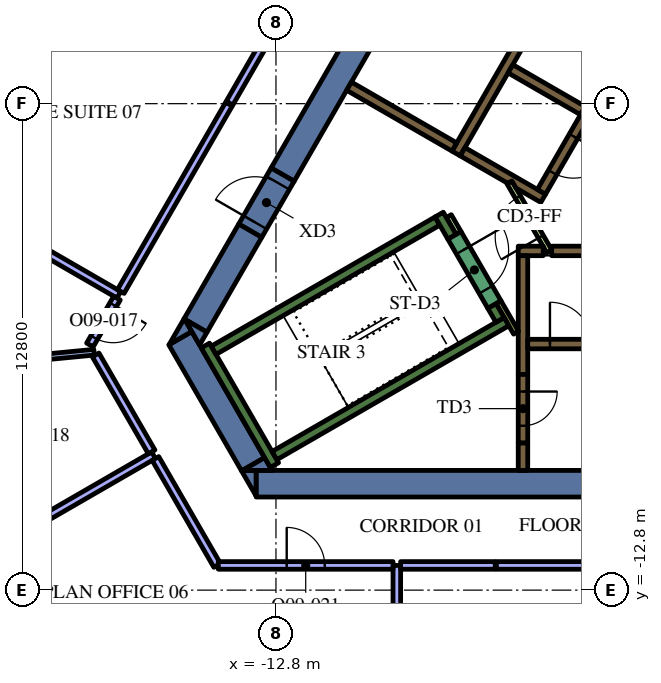
"""IFC4 building model, lengths in metres.
Left out: names, types, materials, properties, quantities, classifications, styles, units other than length and angle.
Written with IfcOpenShell. Run it as: python <this file> out.ifc"""

import sys

from ifc_helpers import new_model, si_unit, direction, frame, frame_2d, origin, place, context, subcontext, project, spatial, polyline, rectangle, outline, extrude, element, fill, save


model = new_model("IFC4")
c1 = context("Model", 3, precision=1e-05, world=origin(), true_north=direction((0.0, 1.0)))
c2 = subcontext(c1, "Body", "Model", "MODEL_VIEW")
j1 = project(units=[si_unit("LENGTHUNIT", "METRE"), si_unit("PLANEANGLEUNIT", "RADIAN")], contexts=[c1])
p1 = place(None, origin())
s1 = spatial("IfcSite", under=j1, at=p1, CompositionType="ELEMENT")
p2 = place(p1, origin())
s2 = spatial("IfcBuilding", under=s1, at=p2, CompositionType="ELEMENT")
p3 = place(p2, frame((0.0, 0.0, 243.6)))
s3 = spatial("IfcBuildingStorey", under=s2, at=p3, CompositionType="ELEMENT", Elevation=243.6)
p4 = place(p3, frame((8.904, -10.0, 0.0), z_axis=(0.0, 0.0, 1.0), x_axis=(-1.0, 0.0, 0.0)))
e1 = element("IfcWall", 1, at=p4, inside=s3, PredefinedType="SOLIDWALL", context=c2, shape_type="SweptSolid", body=[
    extrude(rectangle(XDim=22.226, YDim=0.7, at=frame_2d((11.113, 0.0))), origin(), (0.0, 0.0, 1.0), 4.2),
])
p5 = place(p3, origin())
e2 = element("IfcWall", 2, at=p5, inside=s3, PredefinedType="SOLIDWALL", context=c2, shape_type="SweptSolid", body=[
    extrude(outline(polyline([(-13.712, -9.65), (-13.324, -9.65), (-13.324, -10.322), (-13.712, -9.65)])), origin(), (0.0, 0.0, 1.0), 4.2),
])
p6 = place(p3, frame((-13.402, -9.487, 0.0), z_axis=(0.0, 0.0, 1.0), x_axis=(-0.500020498207, 0.866013568815, 0.0)))
e3 = element("IfcWall", 3, at=p6, inside=s3, PredefinedType="SOLIDWALL", context=c2, shape_type="SweptSolid", body=[
    extrude(rectangle(XDim=3.829, YDim=0.7, at=frame_2d((1.915, 0.0))), origin(), (0.0, 0.0, 1.0), 4.2),
])
e4 = element("IfcWall", 4, at=p5, inside=s3, PredefinedType="SOLIDWALL", context=c2, shape_type="SweptSolid", body=[
    extrude(outline(polyline([(-15.014, -5.995), (-15.611, -6.339), (-15.213, -5.65), (-15.014, -5.995)])), origin(), (0.0, 0.0, 1.0), 4.2),
])
e5 = element("IfcWall", 5, at=p5, inside=s3, PredefinedType="SOLIDWALL", context=c2, shape_type="SweptSolid", body=[
    extrude(outline(polyline([(-12.904, -9.65), (-13.68, -9.65), (-13.098, -9.314), (-12.904, -9.65)])), origin(), (0.0, 0.0, 1.0), 4.2),
])
p7 = place(p3, frame((-13.475, -3.339, 0.0), z_axis=(0.0, 0.0, 1.0), x_axis=(-0.500008214683, -0.866020660983, 0.0)))
e6 = element("IfcWall", 6, at=p7, inside=s3, PredefinedType="SOLIDWALL", context=c2, shape_type="SweptSolid", body=[
    extrude(rectangle(XDim=2.884, YDim=0.7, at=frame_2d((1.442, 0.0))), origin(), (0.0, 0.0, 1.0), 4.2),
])
e7 = element("IfcWall", 7, at=p5, inside=s3, PredefinedType="SOLIDWALL", context=c2, shape_type="SweptSolid", body=[
    extrude(outline(polyline([(-14.809, -6.35), (-15.197, -5.678), (-14.615, -6.014), (-14.809, -6.35)])), origin(), (0.0, 0.0, 1.0), 4.2),
])
p8 = place(p3, frame((-12.625, -1.867, 0.0), z_axis=(0.0, 0.0, 1.0), x_axis=(0.499996974394, 0.866027150612, 0.0)))
e8 = element("IfcWall", 8, at=p8, inside=s3, PredefinedType="SOLIDWALL", context=c2, shape_type="SweptSolid", body=[
    extrude(rectangle(XDim=15.858, YDim=0.7, at=frame_2d((7.929, 0.0))), origin(), (0.0, 0.0, 1.0), 4.2),
])
p9 = place(p3, frame((-12.84, -9.511, 0.0), z_axis=(0.0, 0.0, 1.0), x_axis=(-0.499997733992, 0.866026712061, 0.0)))
e9 = element("IfcWall", 9, at=p9, inside=s3, PredefinedType="SOLIDWALL", context=c2, shape_type="SweptSolid", body=[
    extrude(rectangle(XDim=3.634, YDim=0.25, at=frame_2d((1.817, 0.0))), origin(), (0.0, 0.0, 1.0), 4.2),
])
p10 = place(p3, frame((-14.44, -6.49, 0.0), z_axis=(0.0, 0.0, 1.0), x_axis=(0.866022966069, 0.500004222222, 0.0)))
e10 = element("IfcWall", 10, at=p10, inside=s3, PredefinedType="SOLIDWALL", context=c2, shape_type="SweptSolid", body=[
    extrude(rectangle(XDim=6.8, YDim=0.25, at=frame_2d((3.4, 0.0))), origin(), (0.0, 0.0, 1.0), 4.2),
])
p11 = place(p3, frame((-8.168, -3.503, 0.0), z_axis=(0.0, 0.0, 1.0), x_axis=(-0.499952099219, 0.866053057547, 0.0)))
e11 = element("IfcWall", 11, at=p11, inside=s3, PredefinedType="SOLIDWALL", context=c2, shape_type="SweptSolid", body=[
    extrude(rectangle(XDim=0.675, YDim=0.25, at=frame_2d((0.337, 0.0))), origin(), (0.0, 0.0, 1.0), 4.2),
])
p12 = place(p3, frame((-12.84, -9.261, 0.0), z_axis=(0.0, 0.0, 1.0), x_axis=(0.866016039709, 0.500016218704, 0.0)))
e12 = element("IfcWall", 12, at=p12, inside=s3, PredefinedType="SOLIDWALL", context=c2, shape_type="SweptSolid", body=[
    extrude(rectangle(XDim=7.05, YDim=0.25, at=frame_2d((3.525, 0.0))), origin(), (0.0, 0.0, 1.0), 4.2),
])
p13 = place(p3, frame((-6.905, -5.69, 0.0), z_axis=(0.0, 0.0, 1.0), x_axis=(-0.500402024738, 0.865793170242, 0.0)))
e13 = element("IfcWall", 13, at=p13, inside=s3, PredefinedType="SOLIDWALL", context=c2, shape_type="SweptSolid", body=[
    extrude(rectangle(XDim=0.425, YDim=0.25, at=frame_2d((0.212, 0.0))), origin(), (0.0, 0.0, 1.0), 4.2),
])
p14 = place(p3, frame((-6.3, -8.925, 0.0), z_axis=(0.0, 0.0, 1.0), x_axis=(0.0, -1.0, 0.0)))
e14 = element("IfcWall", 14, at=p14, inside=s3, PredefinedType="SOLIDWALL", context=c2, shape_type="SweptSolid", body=[
    extrude(rectangle(XDim=0.725, YDim=0.25, at=frame_2d((0.363, 0.0))), origin(), (0.0, 0.0, 1.0), 4.2),
])
p15 = place(p3, frame((-5.545, -3.875, 0.0), z_axis=(0.0, 0.0, 1.0), x_axis=(1.0, 0.0, 0.0)))
e15 = element("IfcWall", 15, at=p15, inside=s3, PredefinedType="SOLIDWALL", context=c2, shape_type="SweptSolid", body=[
    extrude(rectangle(XDim=11.97, YDim=0.25, at=frame_2d((5.985, 0.0))), origin(), (0.0, 0.0, 1.0), 4.2),
])
p16 = place(p3, frame((-6.425, -3.875, 0.0), z_axis=(0.0, 0.0, 1.0), x_axis=(1.0, 0.0, 0.0)))
e16 = element("IfcWall", 16, at=p16, inside=s3, PredefinedType="SOLIDWALL", context=c2, shape_type="SweptSolid", body=[
    extrude(rectangle(XDim=0.658, YDim=0.25, at=frame_2d((0.329, 0.0))), origin(), (0.0, 0.0, 1.0), 4.2),
])
p17 = place(p3, frame((-6.3, -7.125, 0.0), z_axis=(0.0, 0.0, 1.0), x_axis=(0.0, 1.0, 0.0)))
e17 = element("IfcWall", 17, at=p17, inside=s3, PredefinedType="SOLIDWALL", context=c2, shape_type="SweptSolid", body=[
    extrude(rectangle(XDim=3.125, YDim=0.25, at=frame_2d((1.562, 0.0))), origin(), (0.0, 0.0, 1.0), 4.2),
])
p18 = place(p3, frame((-8.06, -1.311, 0.0), z_axis=(0.0, 0.0, 1.0), x_axis=(0.50000273126, 0.866023826885, 0.0)))
e18 = element("IfcWall", 18, at=p18, inside=s3, PredefinedType="SOLIDWALL", context=c2, shape_type="SweptSolid", body=[
    extrude(rectangle(XDim=10.33, YDim=0.25, at=frame_2d((5.165, 0.0))), origin(), (0.0, 0.0, 1.0), 4.2),
])
p19 = place(p3, frame((-4.724, -0.182, 0.0), z_axis=(0.0, 0.0, 1.0), x_axis=(-0.866008176907, 0.50002983664, 0.0)))
e19 = element("IfcWall", 19, at=p19, inside=s3, PredefinedType="SOLIDWALL", context=c2, shape_type="SweptSolid", body=[
    extrude(rectangle(XDim=2.2, YDim=0.25, at=frame_2d((1.1, 0.0))), origin(), (0.0, 0.0, 1.0), 4.2),
])
e20 = element("IfcWall", 20, at=p5, inside=s3, PredefinedType="SOLIDWALL", context=c2, shape_type="SweptSolid", body=[
    extrude(outline(polyline([(-5.922, -2.257), (-5.922, -2.257), (-5.705, -2.382), (-5.83, -2.598), (-6.483, -2.221), (-6.591, -2.033), (-6.591, -2.033), (-6.7, -2.096), (-7.952, -1.373), (-7.827, -1.156), (-5.922, -2.257)])), origin(), (0.0, 0.0, 1.0), 4.2),
])
p20 = place(p3, frame((-8.106, -1.14, 0.0), z_axis=(0.0, 0.0, 1.0), x_axis=(-0.866008981251, 0.500028443584, 0.0)))
e21 = element("IfcWall", 21, at=p20, inside=s3, PredefinedType="SOLIDWALL", context=c2, shape_type="SweptSolid", body=[
    extrude(rectangle(XDim=3.2, YDim=0.25, at=frame_2d((1.6, 0.0))), origin(), (0.0, 0.0, 1.0), 4.2),
])
p21 = place(p3, frame((-8.252, -2.958, 0.0), z_axis=(0.0, 0.0, 1.0), x_axis=(0.500174715838, -0.865924508047, 0.0)))
e22 = element("IfcWall", 22, at=p21, inside=s3, PredefinedType="PARTITIONING", context=c2, shape_type="SweptSolid", body=[
    extrude(rectangle(XDim=0.514, YDim=0.15, at=frame_2d((0.257, 0.0))), origin(), (0.0, 0.0, 1.0), 3.45),
])
p22 = place(p3, frame((-6.48, -6.027, 0.0), z_axis=(0.0, 0.0, 1.0), x_axis=(-0.499927229454, 0.866067413802, 0.0)))
e23 = element("IfcWall", 23, at=p22, inside=s3, PredefinedType="PARTITIONING", context=c2, shape_type="SweptSolid", body=[
    extrude(rectangle(XDim=0.929, YDim=0.15, at=frame_2d((0.464, 0.0))), origin(), (0.0, 0.0, 1.0), 4.2),
])
p23 = place(p3, frame((-6.175, -6.325, 0.0), z_axis=(0.0, 0.0, 1.0), x_axis=(1.0, 0.0, 0.0)))
e24 = element("IfcWall", 24, at=p23, inside=s3, PredefinedType="SOLIDWALL", context=c2, shape_type="SweptSolid", body=[
    extrude(rectangle(XDim=12.35, YDim=0.25, at=frame_2d((6.175, 0.0))), origin(), (0.0, 0.0, 1.0), 4.2),
])
p24 = place(p23, frame((0.585, 0.0, 0.0)))
e25 = element("IfcOpeningElement", 25, at=p24, cuts=e24, PredefinedType="OPENING", context=c2, shape_type="SweptSolid", body=[
    extrude(rectangle(XDim=1.1, YDim=2.1, at=frame_2d((0.55, 1.05))), frame((0.0, 0.135, 0.0), z_axis=(0.0, -1.0, 0.0), x_axis=(1.0, 0.0, 0.0)), (0.0, 0.0, 1.0), 0.27),
])
p25 = place(p23, frame((3.105, 0.0, 0.0)))
e26 = element("IfcOpeningElement", 26, at=p25, cuts=e24, PredefinedType="OPENING", context=c2, shape_type="SweptSolid", body=[
    extrude(rectangle(XDim=1.1, YDim=2.1, at=frame_2d((0.55, 1.05))), frame((0.0, 0.135, 0.0), z_axis=(0.0, -1.0, 0.0), x_axis=(1.0, 0.0, 0.0)), (0.0, 0.0, 1.0), 0.27),
])
p26 = place(p23, frame((5.625, 0.0, 0.0)))
e27 = element("IfcOpeningElement", 27, at=p26, cuts=e24, PredefinedType="OPENING", context=c2, shape_type="SweptSolid", body=[
    extrude(rectangle(XDim=1.1, YDim=2.1, at=frame_2d((0.55, 1.05))), frame((0.0, 0.135, 0.0), z_axis=(0.0, -1.0, 0.0), x_axis=(1.0, 0.0, 0.0)), (0.0, 0.0, 1.0), 0.27),
])
p27 = place(p23, frame((8.145, 0.0, 0.0)))
e28 = element("IfcOpeningElement", 28, at=p27, cuts=e24, PredefinedType="OPENING", context=c2, shape_type="SweptSolid", body=[
    extrude(rectangle(XDim=1.1, YDim=2.1, at=frame_2d((0.55, 1.05))), frame((0.0, 0.135, 0.0), z_axis=(0.0, -1.0, 0.0), x_axis=(1.0, 0.0, 0.0)), (0.0, 0.0, 1.0), 0.27),
])
p28 = place(p23, frame((10.665, 0.0, 0.0)))
e29 = element("IfcOpeningElement", 29, at=p28, cuts=e24, PredefinedType="OPENING", context=c2, shape_type="SweptSolid", body=[
    extrude(rectangle(XDim=1.1, YDim=2.1, at=frame_2d((0.55, 1.05))), frame((0.0, 0.135, 0.0), z_axis=(0.0, -1.0, 0.0), x_axis=(1.0, 0.0, 0.0)), (0.0, 0.0, 1.0), 0.27),
])
p29 = place(p3, frame((-0.898, 6.194, 0.0), z_axis=(0.0, 0.0, 1.0), x_axis=(-0.499996202215, -0.866027596426, 0.0)))
e30 = element("IfcWall", 30, at=p29, inside=s3, PredefinedType="SOLIDWALL", context=c2, shape_type="SweptSolid", body=[
    extrude(rectangle(XDim=9.83, YDim=0.25, at=frame_2d((4.915, 0.0))), origin(), (0.0, 0.0, 1.0), 4.2),
])
p30 = place(p29, frame((0.585, 0.0, 0.0)))
e31 = element("IfcOpeningElement", 31, at=p30, cuts=e30, PredefinedType="OPENING", context=c2, shape_type="SweptSolid", body=[
    extrude(rectangle(XDim=1.1, YDim=2.1, at=frame_2d((0.55, 1.05))), frame((0.0, 0.135, 0.0), z_axis=(0.0, -1.0, 0.0), x_axis=(1.0, 0.0, 0.0)), (0.0, 0.0, 1.0), 0.27),
])
p31 = place(p29, frame((3.105, 0.0, 0.0)))
e32 = element("IfcOpeningElement", 32, at=p31, cuts=e30, PredefinedType="OPENING", context=c2, shape_type="SweptSolid", body=[
    extrude(rectangle(XDim=1.1, YDim=2.1, at=frame_2d((0.55, 1.05))), frame((0.0, 0.135, 0.0), z_axis=(0.0, -1.0, 0.0), x_axis=(1.0, 0.0, 0.0)), (0.0, 0.0, 1.0), 0.27),
])
p32 = place(p29, frame((5.625, 0.0, 0.0)))
e33 = element("IfcOpeningElement", 33, at=p32, cuts=e30, PredefinedType="OPENING", context=c2, shape_type="SweptSolid", body=[
    extrude(rectangle(XDim=1.1, YDim=2.1, at=frame_2d((0.55, 1.05))), frame((0.0, 0.135, 0.0), z_axis=(0.0, -1.0, 0.0), x_axis=(1.0, 0.0, 0.0)), (0.0, 0.0, 1.0), 0.27),
])
p33 = place(p29, frame((8.145, 0.0, 0.0)))
e34 = element("IfcOpeningElement", 34, at=p33, cuts=e30, PredefinedType="OPENING", context=c2, shape_type="SweptSolid", body=[
    extrude(rectangle(XDim=1.1, YDim=2.1, at=frame_2d((0.55, 1.05))), frame((0.0, 0.135, 0.0), z_axis=(0.0, -1.0, 0.0), x_axis=(1.0, 0.0, 0.0)), (0.0, 0.0, 1.0), 0.27),
])
p34 = place(p3, frame((-8.103, -3.466, 0.0), z_axis=(0.0, 0.0, 1.0), x_axis=(0.500078061341, -0.865980330357, 0.0)))
e35 = element("IfcWall", 35, at=p34, inside=s3, PredefinedType="SOLIDWALL", context=c2, shape_type="SweptSolid", body=[
    extrude(rectangle(XDim=2.1, YDim=0.4, at=frame_2d((1.05, 0.0))), origin(), (0.0, 0.0, 1.0), 4.2),
])
p35 = place(p34, frame((0.45, 0.0, 0.0)))
e36 = element("IfcOpeningElement", 36, at=p35, cuts=e35, PredefinedType="OPENING", context=c2, shape_type="SweptSolid", body=[
    extrude(rectangle(XDim=1.2, YDim=2.1, at=frame_2d((0.6, 1.05))), frame((0.0, 0.21, 0.0), z_axis=(0.0, -1.0, 0.0), x_axis=(1.0, 0.0, 0.0)), (0.0, 0.0, 1.0), 0.42),
])
p36 = place(p3, frame((-6.3, -7.125, 0.0), z_axis=(0.0, 0.0, 1.0), x_axis=(0.0, -1.0, 0.0)))
e37 = element("IfcWall", 37, at=p36, inside=s3, PredefinedType="SOLIDWALL", context=c2, shape_type="SweptSolid", body=[
    extrude(rectangle(XDim=1.8, YDim=0.25, at=frame_2d((0.9, 0.0))), origin(), (0.0, 0.0, 1.0), 4.2),
])
p37 = place(p36, frame((0.45, 0.0, 0.0)))
e38 = element("IfcOpeningElement", 38, at=p37, cuts=e37, PredefinedType="OPENING", context=c2, shape_type="SweptSolid", body=[
    extrude(rectangle(XDim=0.9, YDim=2.1, at=frame_2d((0.45, 1.05))), frame((0.0, 0.135, 0.0), z_axis=(0.0, -1.0, 0.0), x_axis=(1.0, 0.0, 0.0)), (0.0, 0.0, 1.0), 0.27),
])
p38 = place(p3, frame((-5.606, -3.89, 0.0), z_axis=(0.0, 0.0, 1.0), x_axis=(-0.500027713859, 0.866009402589, 0.0)))
e39 = element("IfcWall", 39, at=p38, inside=s3, PredefinedType="PARTITIONING", context=c2, shape_type="SweptSolid", body=[
    extrude(rectangle(XDim=2.1, YDim=0.15, at=frame_2d((1.05, 0.0))), origin(), (0.0, 0.0, 1.0), 3.45),
])
p39 = place(p38, frame((0.45, 0.0, 0.0)))
e40 = element("IfcOpeningElement", 40, at=p39, cuts=e39, PredefinedType="OPENING", context=c2, shape_type="SweptSolid", body=[
    extrude(rectangle(XDim=1.2, YDim=2.1, at=frame_2d((0.6, 1.05))), frame((0.0, 0.085, 0.0), z_axis=(0.0, -1.0, 0.0), x_axis=(1.0, 0.0, 0.0)), (0.0, 0.0, 1.0), 0.17),
])
p40 = place(p3, frame((-13.475, -3.339, 0.0), z_axis=(0.0, 0.0, 1.0), x_axis=(0.499954529098, 0.86605165483, 0.0)))
e41 = element("IfcWall", 41, at=p40, inside=s3, PredefinedType="SOLIDWALL", context=c2, shape_type="SweptSolid", body=[
    extrude(rectangle(XDim=1.7, YDim=0.7, at=frame_2d((0.85, 0.0))), origin(), (0.0, 0.0, 1.0), 4.2),
])
p41 = place(p40, frame((0.25, 0.0, 0.0)))
e42 = element("IfcOpeningElement", 42, at=p41, cuts=e41, PredefinedType="OPENING", context=c2, shape_type="SweptSolid", body=[
    extrude(rectangle(XDim=1.2, YDim=2.1, at=frame_2d((0.6, 1.05))), frame((0.0, 0.36, 0.0), z_axis=(0.0, -1.0, 0.0), x_axis=(1.0, 0.0, 0.0)), (0.0, 0.0, 1.0), 0.72),
])
p42 = place(p3, frame((-9.62, -15.654, 0.0), z_axis=(0.0, 0.0, 1.0), x_axis=(0.0, 1.0, 0.0)))
e43 = element("IfcWall", 43, at=p42, inside=s3, PredefinedType="PARTITIONING", context=c2, shape_type="SweptSolid", body=[
    extrude(rectangle(XDim=3.504, YDim=0.2, at=frame_2d((1.752, 0.0))), origin(), (0.0, 0.0, 1.0), 3.45),
])
p43 = place(p3, frame((-7.0, -12.15, 0.0), z_axis=(0.0, 0.0, 1.0), x_axis=(1.0, 0.0, 0.0)))
e44 = element("IfcWall", 44, at=p43, inside=s3, PredefinedType="PARTITIONING", context=c2, shape_type="SweptSolid", body=[
    extrude(rectangle(XDim=14.0, YDim=0.2, at=frame_2d((7.0, 0.0))), origin(), (0.0, 0.0, 1.0), 3.45),
])
p44 = place(p43, frame((6.5, 0.0, 0.0)))
e45 = element("IfcOpeningElement", 45, at=p44, cuts=e44, PredefinedType="OPENING", context=c2, shape_type="SweptSolid", body=[
    extrude(rectangle(XDim=1.0, YDim=2.1, at=frame_2d((0.5, 1.05))), frame((0.0, 0.11, 0.0), z_axis=(0.0, -1.0, 0.0), x_axis=(1.0, 0.0, 0.0)), (0.0, 0.0, 1.0), 0.22),
])
p45 = place(p3, frame((-9.52, -12.15, 0.0), z_axis=(0.0, 0.0, 1.0), x_axis=(1.0, 0.0, 0.0)))
e46 = element("IfcWall", 46, at=p45, inside=s3, PredefinedType="PARTITIONING", context=c2, shape_type="SweptSolid", body=[
    extrude(rectangle(XDim=2.49, YDim=0.2, at=frame_2d((1.245, 0.0))), origin(), (0.0, 0.0, 1.0), 3.45),
])
p46 = place(p3, frame((-16.934, -5.03, 0.0), z_axis=(0.0, 0.0, 1.0), x_axis=(-0.866031916153, 0.499988720078, 0.0)))
e47 = element("IfcWall", 47, at=p46, inside=s3, PredefinedType="PARTITIONING", context=c2, shape_type="SweptSolid", body=[
    extrude(rectangle(XDim=3.492, YDim=0.2, at=frame_2d((1.746, 0.0))), origin(), (0.0, 0.0, 1.0), 3.45),
])
p47 = place(p3, frame((-7.364, 11.545, 0.0), z_axis=(0.0, 0.0, 1.0), x_axis=(-0.500001759768, -0.86602438778, 0.0)))
e48 = element("IfcWall", 48, at=p47, inside=s3, PredefinedType="PARTITIONING", context=c2, shape_type="SweptSolid", body=[
    extrude(rectangle(XDim=13.317, YDim=0.2, at=frame_2d((6.658, 0.0))), origin(), (0.0, 0.0, 1.0), 3.45),
])
p48 = place(p47, frame((6.2, 0.0, 0.0)))
e49 = element("IfcOpeningElement", 49, at=p48, cuts=e48, PredefinedType="OPENING", context=c2, shape_type="SweptSolid", body=[
    extrude(rectangle(XDim=1.0, YDim=2.1, at=frame_2d((0.5, 1.05))), frame((0.0, 0.11, 0.0), z_axis=(0.0, -1.0, 0.0), x_axis=(1.0, 0.0, 0.0)), (0.0, 0.0, 1.0), 0.22),
])
p49 = place(p3, frame((-14.037, -0.013, 0.0), z_axis=(0.0, 0.0, 1.0), x_axis=(-0.500018205831, -0.866014892388, 0.0)))
e50 = element("IfcWall", 50, at=p49, inside=s3, PredefinedType="PARTITIONING", context=c2, shape_type="SweptSolid", body=[
    extrude(rectangle(XDim=5.693, YDim=0.2, at=frame_2d((2.846, 0.0))), origin(), (0.0, 0.0, 1.0), 3.45),
])
p50 = place(p3, frame((-17.586, -6.54, 0.0), z_axis=(0.0, 0.0, 1.0), x_axis=(-0.995356357863, -0.096258614479, 0.0)))
e51 = element("IfcWall", 51, at=p50, inside=s3, PredefinedType="PARTITIONING", context=c2, shape_type="SweptSolid", body=[
    extrude(rectangle(XDim=3.926, YDim=0.15, at=frame_2d((1.963, 0.0))), origin(), (0.0, 0.0, 1.0), 3.45),
])
p51 = place(p50, frame((1.3, 0.0, 0.0)))
e52 = element("IfcOpeningElement", 52, at=p51, cuts=e51, PredefinedType="OPENING", context=c2, shape_type="SweptSolid", body=[
    extrude(rectangle(XDim=0.9, YDim=2.1, at=frame_2d((0.45, 1.05))), frame((0.0, 0.085, 0.0), z_axis=(0.0, -1.0, 0.0), x_axis=(1.0, 0.0, 0.0)), (0.0, 0.0, 1.0), 0.17),
])
p52 = place(p3, frame((-16.983, -5.116, 0.0), z_axis=(0.0, 0.0, 1.0), x_axis=(-0.500009219579, -0.866020080793, 0.0)))
e53 = element("IfcWall", 53, at=p52, inside=s3, PredefinedType="PARTITIONING", context=c2, shape_type="SweptSolid", body=[
    extrude(rectangle(XDim=1.425, YDim=0.2, at=frame_2d((0.712, 0.0))), origin(), (0.0, 0.0, 1.0), 3.45),
])
p53 = place(p52, frame((0.2, 0.0, 0.0)))
e54 = element("IfcOpeningElement", 54, at=p53, cuts=e53, PredefinedType="OPENING", context=c2, shape_type="SweptSolid", body=[
    extrude(rectangle(XDim=1.0, YDim=2.1, at=frame_2d((0.5, 1.05))), frame((0.0, 0.11, 0.0), z_axis=(0.0, -1.0, 0.0), x_axis=(1.0, 0.0, 0.0)), (0.0, 0.0, 1.0), 0.22),
])
p54 = place(p3, frame((-16.021, -9.25, 0.0), z_axis=(0.0, 0.0, 1.0), x_axis=(-0.86602692059, -0.499997372806, 0.0)))
e55 = element("IfcWall", 55, at=p54, inside=s3, PredefinedType="PARTITIONING", context=c2, shape_type="SweptSolid", body=[
    extrude(rectangle(XDim=6.765, YDim=0.2, at=frame_2d((3.382, 0.0))), origin(), (0.0, 0.0, 1.0), 3.45),
])
p55 = place(p3, frame((-17.545, -6.612, 0.0), z_axis=(0.0, 0.0, 1.0), x_axis=(0.500006981563, -0.86602137294, 0.0)))
e56 = element("IfcWall", 56, at=p55, inside=s3, PredefinedType="PARTITIONING", context=c2, shape_type="SweptSolid", body=[
    extrude(rectangle(XDim=2.946, YDim=0.2, at=frame_2d((1.473, 0.0))), origin(), (0.0, 0.0, 1.0), 3.45),
])
p56 = place(p3, frame((-15.971, -9.337, 0.0), z_axis=(0.0, 0.0, 1.0), x_axis=(0.500010870188, -0.866019127788, 0.0)))
e57 = element("IfcWall", 57, at=p56, inside=s3, PredefinedType="PARTITIONING", context=c2, shape_type="SweptSolid", body=[
    extrude(rectangle(XDim=3.249, YDim=0.2, at=frame_2d((1.624, 0.0))), origin(), (0.0, 0.0, 1.0), 3.45),
])
p57 = place(p3, frame((-14.317, -12.15, 0.0), z_axis=(0.0, 0.0, 1.0), x_axis=(1.0, 0.0, 0.0)))
e58 = element("IfcWall", 58, at=p57, inside=s3, PredefinedType="PARTITIONING", context=c2, shape_type="SweptSolid", body=[
    extrude(rectangle(XDim=4.597, YDim=0.2, at=frame_2d((2.299, 0.0))), origin(), (0.0, 0.0, 1.0), 3.45),
])
p58 = place(p57, frame((1.8, 0.0, 0.0)))
e59 = element("IfcOpeningElement", 59, at=p58, cuts=e58, PredefinedType="OPENING", context=c2, shape_type="SweptSolid", body=[
    extrude(rectangle(XDim=1.0, YDim=2.1, at=frame_2d((0.5, 1.05))), frame((0.0, 0.11, 0.0), z_axis=(0.0, -1.0, 0.0), x_axis=(1.0, 0.0, 0.0)), (0.0, 0.0, 1.0), 0.22),
])
p59 = place(p24, origin())
e60 = element("IfcDoor", 60, at=p59, inside=s3, OperationType="DOUBLE_DOOR_SLIDING", PredefinedType="DOOR", context=c2, shape_type="SweptSolid", body=[
    extrude(rectangle(XDim=1.1, YDim=2.1, at=frame_2d((0.55, 1.05))), frame((0.0, 0.025, 0.0), z_axis=(0.0, -1.0, 0.0), x_axis=(1.0, 0.0, 0.0)), (0.0, 0.0, 1.0), 0.05),
])
fill(e25, e60)
p60 = place(p33, origin())
e61 = element("IfcDoor", 61, at=p60, inside=s3, OperationType="DOUBLE_DOOR_SLIDING", PredefinedType="DOOR", context=c2, shape_type="SweptSolid", body=[
    extrude(rectangle(XDim=1.1, YDim=2.1, at=frame_2d((0.55, 1.05))), frame((0.0, 0.025, 0.0), z_axis=(0.0, -1.0, 0.0), x_axis=(1.0, 0.0, 0.0)), (0.0, 0.0, 1.0), 0.05),
])
fill(e34, e61)
p61 = place(p35, origin())
e62 = element("IfcDoor", 62, at=p61, inside=s3, OperationType="SINGLE_SWING_LEFT", PredefinedType="DOOR", context=c2, shape_type="SweptSolid", body=[
    extrude(rectangle(XDim=1.2, YDim=2.1, at=frame_2d((0.6, 1.05))), frame((0.0, 0.025, 0.0), z_axis=(0.0, -1.0, 0.0), x_axis=(1.0, 0.0, 0.0)), (0.0, 0.0, 1.0), 0.05),
])
fill(e36, e62)
p62 = place(p37, origin())
e63 = element("IfcDoor", 63, at=p62, inside=s3, OperationType="SINGLE_SWING_LEFT", PredefinedType="DOOR", context=c2, shape_type="SweptSolid", body=[
    extrude(rectangle(XDim=0.9, YDim=2.1, at=frame_2d((0.45, 1.05))), frame((0.0, 0.025, 0.0), z_axis=(0.0, -1.0, 0.0), x_axis=(1.0, 0.0, 0.0)), (0.0, 0.0, 1.0), 0.05),
])
fill(e38, e63)
p63 = place(p39, origin())
e64 = element("IfcDoor", 64, at=p63, inside=s3, OperationType="SINGLE_SWING_LEFT", PredefinedType="DOOR", context=c2, shape_type="SweptSolid", body=[
    extrude(rectangle(XDim=1.2, YDim=2.1, at=frame_2d((0.6, 1.05))), frame((0.0, 0.025, 0.0), z_axis=(0.0, -1.0, 0.0), x_axis=(1.0, 0.0, 0.0)), (0.0, 0.0, 1.0), 0.05),
])
fill(e40, e64)
p64 = place(p41, origin())
e65 = element("IfcDoor", 65, at=p64, inside=s3, OperationType="SINGLE_SWING_LEFT", PredefinedType="DOOR", context=c2, shape_type="SweptSolid", body=[
    extrude(rectangle(XDim=1.2, YDim=2.1, at=frame_2d((0.6, 1.05))), frame((0.0, 0.025, 0.0), z_axis=(0.0, -1.0, 0.0), x_axis=(1.0, 0.0, 0.0)), (0.0, 0.0, 1.0), 0.05),
])
fill(e42, e65)
p65 = place(p53, origin())
e66 = element("IfcDoor", 66, at=p65, inside=s3, OperationType="SINGLE_SWING_LEFT", PredefinedType="DOOR", context=c2, shape_type="SweptSolid", body=[
    extrude(rectangle(XDim=1.0, YDim=2.1, at=frame_2d((0.5, 1.05))), frame((0.0, 0.025, 0.0), z_axis=(0.0, -1.0, 0.0), x_axis=(1.0, 0.0, 0.0)), (0.0, 0.0, 1.0), 0.05),
])
fill(e54, e66)
p66 = place(p58, origin())
e67 = element("IfcDoor", 67, at=p66, inside=s3, OperationType="SINGLE_SWING_RIGHT", PredefinedType="DOOR", context=c2, shape_type="SweptSolid", body=[
    extrude(rectangle(XDim=1.0, YDim=2.1, at=frame_2d((0.5, 1.05))), frame((0.0, 0.025, 0.0), z_axis=(0.0, -1.0, 0.0), x_axis=(1.0, 0.0, 0.0)), (0.0, 0.0, 1.0), 0.05),
])
fill(e59, e67)
save(model, sys.argv[1])
